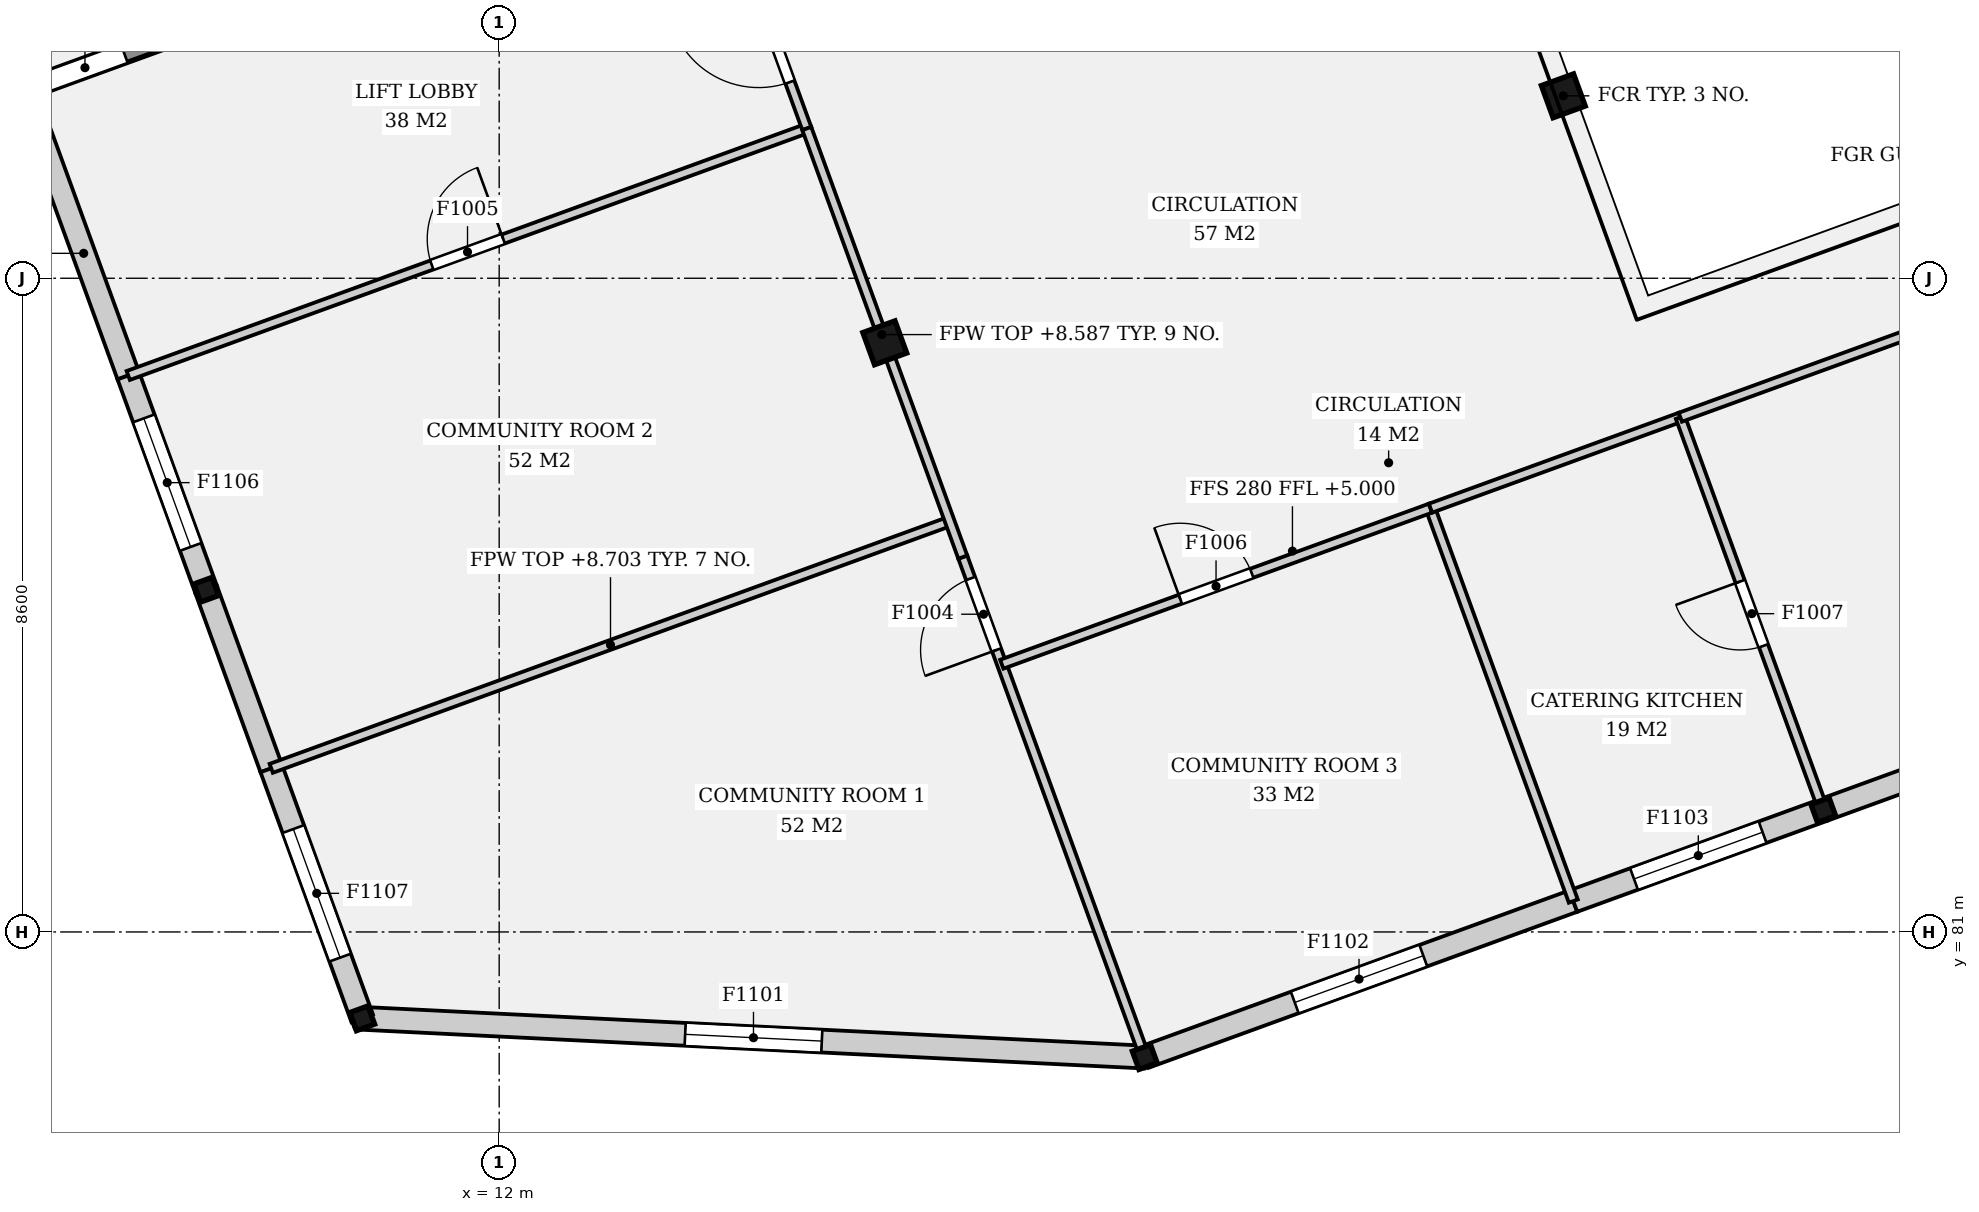
"""IFC4 building model, lengths in metres.
Left out: names, types, materials, properties, quantities, classifications, styles, units other than length and angle.
Written with IfcOpenShell. Run it as: python <this file> out.ifc"""

import sys

from ifc_helpers import new_model, si_unit, direction, frame, frame_2d, origin, origin_2d, place, context, subcontext, project, spatial, rectangle, hollow_rectangle, extrude, element, fill, save


model = new_model("IFC4")
c1 = context("Model", 3, precision=1e-05, world=origin(), true_north=direction((0.0, 1.0)))
c2 = subcontext(c1, "Body", "Model", "MODEL_VIEW")
j1 = project(units=[si_unit("LENGTHUNIT", "METRE"), si_unit("PLANEANGLEUNIT", "RADIAN")], contexts=[c1])
p1 = place(None, origin())
s1 = spatial("IfcSite", under=j1, at=p1, CompositionType="ELEMENT")
p2 = place(p1, origin())
s2 = spatial("IfcBuilding", under=s1, at=p2, CompositionType="ELEMENT")
p3 = place(p2, frame((0.0, 0.0, 5.0)))
s3 = spatial("IfcBuildingStorey", under=s2, at=p3, CompositionType="ELEMENT", Elevation=5.0)
for number, where, z_axis, x_axis in (
    (1, (10.198, 79.864, 0.0), (0.0, 0.0, 1.0), (0.94, 0.342, 0.0)),
    (2, (20.493, 79.354, 0.0), (0.0, 0.0, 1.0), (0.94, 0.342, 0.0)),
    (3, (29.42, 82.603, 0.0), (0.0, 0.0, 1.0), (0.94, 0.342, 0.0)),
    (4, (8.146, 85.502, 0.0), (0.0, 0.0, 1.0), (0.94, 0.342, 0.0)),
):
    element("IfcColumn", number, at=place(p3, frame(where, z_axis=z_axis, x_axis=x_axis)), inside=s3, PredefinedType="COLUMN", context=c2, shape_type="SweptSolid", body=[
        extrude(hollow_rectangle(XDim=0.254, YDim=0.254, WallThickness=0.012, at=origin_2d()), origin(), (0.0, 0.0, 1.0), 4.4),
    ])
for number, where, z_axis, x_axis in (
    (5, (17.073, 88.751, 0.0), (0.0, 0.0, 1.0), (0.94, 0.342, 0.0)),
    (6, (26.0, 92.0, 0.0), (0.0, 0.0, 1.0), (0.94, 0.342, 0.0)),
):
    element("IfcColumn", number, at=place(p3, frame(where, z_axis=z_axis, x_axis=x_axis)), inside=s3, PredefinedType="COLUMN", context=c2, shape_type="SweptSolid", body=[
        extrude(rectangle(XDim=0.45, YDim=0.45, at=origin_2d()), origin(), (0.0, 0.0, 1.0), 4.4),
    ])
p4 = place(p3, frame((5.752, 92.08, 0.0), z_axis=(0.0, 0.0, 1.0), x_axis=(0.939697665127, 0.342006283793, 0.0)))
e7 = element("IfcWall", 7, at=p4, inside=s3, PredefinedType="SOLIDWALL", context=c2, shape_type="SweptSolid", body=[
    extrude(rectangle(XDim=7.0, YDim=0.25, at=frame_2d((3.5, 0.0))), origin(), (0.0, 0.0, 1.0), 4.12),
])
p5 = place(p4, frame((0.3, 0.0, 0.0)))
e8 = element("IfcOpeningElement", 8, at=p5, cuts=e7, PredefinedType="OPENING", context=c2, shape_type="SweptSolid", body=[
    extrude(rectangle(XDim=1.1, YDim=2.1, at=frame_2d((0.55, 1.05))), frame((0.0, 0.135, 0.0), z_axis=(0.0, -1.0, 0.0), x_axis=(1.0, 0.0, 0.0)), (0.0, 0.0, 1.0), 0.27),
])
p6 = place(p3, frame((10.198, 79.864, 0.0), z_axis=(0.0, 0.0, 1.0), x_axis=(0.998777549242, -0.049430831779, 0.0)))
e9 = element("IfcWall", 9, at=p6, inside=s3, PredefinedType="ELEMENTEDWALL", context=c2, shape_type="SweptSolid", body=[
    extrude(rectangle(XDim=10.308, YDim=0.3, at=frame_2d((5.154, 0.0))), origin(), (0.0, 0.0, 1.0), 3.703),
])
p7 = place(p6, frame((4.254, 0.0, 0.9)))
e10 = element("IfcOpeningElement", 10, at=p7, cuts=e9, PredefinedType="OPENING", context=c2, shape_type="SweptSolid", body=[
    extrude(rectangle(XDim=1.8, YDim=2.4, at=frame_2d((0.9, 1.2))), frame((0.0, 0.16, 0.0), z_axis=(0.0, -1.0, 0.0), x_axis=(1.0, 0.0, 0.0)), (0.0, 0.0, 1.0), 0.32),
])
p8 = place(p3, frame((20.493, 79.354, 0.0), z_axis=(0.0, 0.0, 1.0), x_axis=(0.939699533273, 0.342001150825, 0.0)))
e11 = element("IfcWall", 11, at=p8, inside=s3, PredefinedType="ELEMENTEDWALL", context=c2, shape_type="SweptSolid", body=[
    extrude(rectangle(XDim=6.0, YDim=0.3, at=frame_2d((3.0, 0.0))), origin(), (0.0, 0.0, 1.0), 3.703),
])
p9 = place(p8, frame((2.1, 0.0, 0.9)))
e12 = element("IfcOpeningElement", 12, at=p9, cuts=e11, PredefinedType="OPENING", context=c2, shape_type="SweptSolid", body=[
    extrude(rectangle(XDim=1.8, YDim=2.4, at=frame_2d((0.9, 1.2))), frame((0.0, 0.16, 0.0), z_axis=(0.0, -1.0, 0.0), x_axis=(1.0, 0.0, 0.0)), (0.0, 0.0, 1.0), 0.32),
])
p10 = place(p3, frame((26.131, 81.406, 0.0), z_axis=(0.0, 0.0, 1.0), x_axis=(0.939693585395, 0.342017493073, 0.0)))
e13 = element("IfcWall", 13, at=p10, inside=s3, PredefinedType="ELEMENTEDWALL", context=c2, shape_type="SweptSolid", body=[
    extrude(rectangle(XDim=3.5, YDim=0.3, at=frame_2d((1.75, 0.0))), origin(), (0.0, 0.0, 1.0), 3.703),
])
p11 = place(p10, frame((0.85, 0.0, 0.9)))
e14 = element("IfcOpeningElement", 14, at=p11, cuts=e13, PredefinedType="OPENING", context=c2, shape_type="SweptSolid", body=[
    extrude(rectangle(XDim=1.8, YDim=2.4, at=frame_2d((0.9, 1.2))), frame((0.0, 0.16, 0.0), z_axis=(0.0, -1.0, 0.0), x_axis=(1.0, 0.0, 0.0)), (0.0, 0.0, 1.0), 0.32),
])
p12 = place(p3, frame((29.42, 82.603, 0.0), z_axis=(0.0, 0.0, 1.0), x_axis=(0.939692088769, 0.342021605027, 0.0)))
e15 = element("IfcWall", 15, at=p12, inside=s3, PredefinedType="ELEMENTEDWALL", context=c2, shape_type="SweptSolid", body=[
    extrude(rectangle(XDim=9.5, YDim=0.3, at=frame_2d((4.75, 0.0))), origin(), (0.0, 0.0, 1.0), 3.703),
])
p13 = place(p12, frame((3.85, 0.0, 0.9)))
e16 = element("IfcOpeningElement", 16, at=p13, cuts=e15, PredefinedType="OPENING", context=c2, shape_type="SweptSolid", body=[
    extrude(rectangle(XDim=1.8, YDim=2.4, at=frame_2d((0.9, 1.2))), frame((0.0, 0.16, 0.0), z_axis=(0.0, -1.0, 0.0), x_axis=(1.0, 0.0, 0.0)), (0.0, 0.0, 1.0), 0.32),
])
p14 = place(p3, frame((5.752, 92.08, 0.0), z_axis=(0.0, 0.0, 1.0), x_axis=(0.342037080957, -0.939686455819, 0.0)))
e17 = element("IfcWall", 17, at=p14, inside=s3, PredefinedType="ELEMENTEDWALL", context=c2, shape_type="SweptSolid", body=[
    extrude(rectangle(XDim=4.0, YDim=0.3, at=frame_2d((2.0, 0.0))), origin(), (0.0, 0.0, 1.0), 3.703),
])
p15 = place(p3, frame((7.12, 88.321, 0.0), z_axis=(0.0, 0.0, 1.0), x_axis=(0.341965219194, -0.939712609717, 0.0)))
e18 = element("IfcWall", 18, at=p15, inside=s3, PredefinedType="ELEMENTEDWALL", context=c2, shape_type="SweptSolid", body=[
    extrude(rectangle(XDim=3.0, YDim=0.3, at=frame_2d((1.5, 0.0))), origin(), (0.0, 0.0, 1.0), 3.703),
])
p16 = place(p15, frame((0.6, 0.0, 0.9)))
e19 = element("IfcOpeningElement", 19, at=p16, cuts=e18, PredefinedType="OPENING", context=c2, shape_type="SweptSolid", body=[
    extrude(rectangle(XDim=1.8, YDim=2.4, at=frame_2d((0.9, 1.2))), frame((0.0, 0.16, 0.0), z_axis=(0.0, -1.0, 0.0), x_axis=(1.0, 0.0, 0.0)), (0.0, 0.0, 1.0), 0.32),
])
p17 = place(p3, frame((8.146, 85.502, 0.0), z_axis=(0.0, 0.0, 1.0), x_axis=(0.342064500802, -0.939676474799, 0.0)))
e20 = element("IfcWall", 20, at=p17, inside=s3, PredefinedType="ELEMENTEDWALL", context=c2, shape_type="SweptSolid", body=[
    extrude(rectangle(XDim=2.5, YDim=0.3, at=frame_2d((1.25, 0.0))), origin(), (0.0, 0.0, 1.0), 3.703),
])
p18 = place(p3, frame((9.001, 83.152, 0.0), z_axis=(0.0, 0.0, 1.0), x_axis=(0.342017493073, -0.939693585395, 0.0)))
e21 = element("IfcWall", 21, at=p18, inside=s3, PredefinedType="ELEMENTEDWALL", context=c2, shape_type="SweptSolid", body=[
    extrude(rectangle(XDim=3.5, YDim=0.3, at=frame_2d((1.75, 0.0))), origin(), (0.0, 0.0, 1.0), 3.703),
])
p19 = place(p18, frame((0.85, 0.0, 0.9)))
e22 = element("IfcOpeningElement", 22, at=p19, cuts=e21, PredefinedType="OPENING", context=c2, shape_type="SweptSolid", body=[
    extrude(rectangle(XDim=1.8, YDim=2.4, at=frame_2d((0.9, 1.2))), frame((0.0, 0.16, 0.0), z_axis=(0.0, -1.0, 0.0), x_axis=(1.0, 0.0, 0.0)), (0.0, 0.0, 1.0), 0.32),
])
p20 = place(p3, frame((7.12, 88.321, 0.0), z_axis=(0.0, 0.0, 1.0), x_axis=(0.939697342025, 0.342007171549, 0.0)))
e23 = element("IfcWall", 23, at=p20, inside=s3, PredefinedType="PARTITIONING", context=c2, shape_type="SweptSolid", body=[
    extrude(rectangle(XDim=9.5, YDim=0.125, at=frame_2d((4.75, 0.0))), origin(), (0.0, 0.0, 1.0), 3.587),
])
p21 = place(p20, frame((4.25, 0.0, 0.0)))
e24 = element("IfcOpeningElement", 24, at=p21, cuts=e23, PredefinedType="OPENING", context=c2, shape_type="SweptSolid", body=[
    extrude(rectangle(XDim=1.0, YDim=2.1, at=frame_2d((0.5, 1.05))), frame((0.0, 0.073, 0.0), z_axis=(0.0, -1.0, 0.0), x_axis=(1.0, 0.0, 0.0)), (0.0, 0.0, 1.0), 0.145),
])
p22 = place(p3, frame((16.047, 91.57, 0.0), z_axis=(0.0, 0.0, 1.0), x_axis=(-0.342037080957, 0.939686455819, 0.0)))
e25 = element("IfcWall", 25, at=p22, inside=s3, PredefinedType="PARTITIONING", context=c2, shape_type="SweptSolid", body=[
    extrude(rectangle(XDim=4.0, YDim=0.125, at=frame_2d((2.0, 0.0))), origin(), (0.0, 0.0, 1.0), 3.587),
])
p23 = place(p22, frame((0.65, 0.0, 0.0)))
e26 = element("IfcOpeningElement", 26, at=p23, cuts=e25, PredefinedType="OPENING", context=c2, shape_type="SweptSolid", body=[
    extrude(rectangle(XDim=1.2, YDim=2.1, at=frame_2d((0.6, 1.05))), frame((0.0, 0.073, 0.0), z_axis=(0.0, -1.0, 0.0), x_axis=(1.0, 0.0, 0.0)), (0.0, 0.0, 1.0), 0.145),
])
p24 = place(p3, frame((26.131, 81.406, 0.0), z_axis=(0.0, 0.0, 1.0), x_axis=(-0.34202461616, 0.939690992795, 0.0)))
e27 = element("IfcWall", 27, at=p24, inside=s3, PredefinedType="PARTITIONING", context=c2, shape_type="SweptSolid", body=[
    extrude(rectangle(XDim=5.5, YDim=0.125, at=frame_2d((2.75, 0.0))), origin(), (0.0, 0.0, 1.0), 3.703),
])
p25 = place(p3, frame((24.25, 86.574, 0.0), z_axis=(0.0, 0.0, 1.0), x_axis=(0.939671164665, 0.342079087782, 0.0)))
e28 = element("IfcWall", 28, at=p25, inside=s3, PredefinedType="PARTITIONING", context=c2, shape_type="SweptSolid", body=[
    extrude(rectangle(XDim=3.5, YDim=0.125, at=frame_2d((1.75, 0.0))), origin(), (0.0, 0.0, 1.0), 3.703),
])
p26 = place(p3, frame((29.42, 82.603, 0.0), z_axis=(0.0, 0.0, 1.0), x_axis=(-0.342010349897, 0.939696185245, 0.0)))
e29 = element("IfcWall", 29, at=p26, inside=s3, PredefinedType="PARTITIONING", context=c2, shape_type="SweptSolid", body=[
    extrude(rectangle(XDim=5.5, YDim=0.125, at=frame_2d((2.75, 0.0))), origin(), (0.0, 0.0, 1.0), 3.703),
])
p27 = place(p26, frame((2.3, 0.0, 0.0)))
e30 = element("IfcOpeningElement", 30, at=p27, cuts=e29, PredefinedType="OPENING", context=c2, shape_type="SweptSolid", body=[
    extrude(rectangle(XDim=0.9, YDim=2.1, at=frame_2d((0.45, 1.05))), frame((0.0, 0.073, 0.0), z_axis=(0.0, -1.0, 0.0), x_axis=(1.0, 0.0, 0.0)), (0.0, 0.0, 1.0), 0.145),
])
p28 = place(p3, frame((9.001, 83.152, 0.0), z_axis=(0.0, 0.0, 1.0), x_axis=(0.939689082478, 0.342029864589, 0.0)))
e31 = element("IfcWall", 31, at=p28, inside=s3, PredefinedType="PARTITIONING", context=c2, shape_type="SweptSolid", body=[
    extrude(rectangle(XDim=9.5, YDim=0.125, at=frame_2d((4.75, 0.0))), origin(), (0.0, 0.0, 1.0), 3.703),
])
p29 = place(p3, frame((20.493, 79.354, 0.0), z_axis=(0.0, 0.0, 1.0), x_axis=(-0.342017493073, 0.939693585395, 0.0)))
e32 = element("IfcWall", 32, at=p29, inside=s3, PredefinedType="PARTITIONING", context=c2, shape_type="SweptSolid", body=[
    extrude(rectangle(XDim=7.0, YDim=0.125, at=frame_2d((3.5, 0.0))), origin(), (0.0, 0.0, 1.0), 3.587),
])
p30 = place(p29, frame((5.7, 0.0, 0.0)))
e33 = element("IfcOpeningElement", 33, at=p30, cuts=e32, PredefinedType="OPENING", context=c2, shape_type="SweptSolid", body=[
    extrude(rectangle(XDim=1.0, YDim=2.1, at=frame_2d((0.5, 1.05))), frame((0.0, 0.073, 0.0), z_axis=(0.0, -1.0, 0.0), x_axis=(1.0, 0.0, 0.0)), (0.0, 0.0, 1.0), 0.145),
])
p31 = place(p3, frame((18.612, 84.522, 0.0), z_axis=(0.0, 0.0, 1.0), x_axis=(0.939699533273, 0.342001150825, 0.0)))
e34 = element("IfcWall", 34, at=p31, inside=s3, PredefinedType="PARTITIONING", context=c2, shape_type="SweptSolid", body=[
    extrude(rectangle(XDim=6.0, YDim=0.125, at=frame_2d((3.0, 0.0))), origin(), (0.0, 0.0, 1.0), 3.587),
])
p32 = place(p31, frame((2.5, 0.0, 0.0)))
e35 = element("IfcOpeningElement", 35, at=p32, cuts=e34, PredefinedType="OPENING", context=c2, shape_type="SweptSolid", body=[
    extrude(rectangle(XDim=1.0, YDim=2.1, at=frame_2d((0.5, 1.05))), frame((0.0, 0.073, 0.0), z_axis=(0.0, -1.0, 0.0), x_axis=(1.0, 0.0, 0.0)), (0.0, 0.0, 1.0), 0.145),
])
p33 = place(p3, frame((18.099, 85.932, 0.0), z_axis=(0.0, 0.0, 1.0), x_axis=(-0.342037080957, 0.939686455819, 0.0)))
e36 = element("IfcWall", 36, at=p33, inside=s3, PredefinedType="PARTITIONING", context=c2, shape_type="SweptSolid", body=[
    extrude(rectangle(XDim=6.0, YDim=0.125, at=frame_2d((3.0, 0.0))), origin(), (0.0, 0.0, 1.0), 3.587),
])
p34 = place(p3, frame((27.539, 87.771, 0.0), z_axis=(0.0, 0.0, 1.0), x_axis=(0.939696917863, 0.342008336972, 0.0)))
e37 = element("IfcWall", 37, at=p34, inside=s3, PredefinedType="PARTITIONING", context=c2, shape_type="SweptSolid", body=[
    extrude(rectangle(XDim=15.0, YDim=0.125, at=frame_2d((7.5, 0.0))), origin(), (0.0, 0.0, 1.0), 3.703),
])
p35 = place(p34, frame((6.6, 0.0, 0.0)))
e38 = element("IfcOpeningElement", 38, at=p35, cuts=e37, PredefinedType="OPENING", context=c2, shape_type="SweptSolid", body=[
    extrude(rectangle(XDim=1.8, YDim=2.1, at=frame_2d((0.9, 1.05))), frame((0.0, 0.073, 0.0), z_axis=(0.0, -1.0, 0.0), x_axis=(1.0, 0.0, 0.0)), (0.0, 0.0, 1.0), 0.145),
])
p36 = place(p7, origin())
e39 = element("IfcWindow", 39, at=p36, inside=s3, PartitioningType="SINGLE_PANEL", PredefinedType="WINDOW", context=c2, shape_type="SweptSolid", body=[
    extrude(rectangle(XDim=1.8, YDim=2.4, at=frame_2d((0.9, 1.2))), frame((0.0, 0.03, 0.0), z_axis=(0.0, -1.0, 0.0), x_axis=(1.0, 0.0, 0.0)), (0.0, 0.0, 1.0), 0.06),
])
fill(e10, e39)
p37 = place(p9, origin())
e40 = element("IfcWindow", 40, at=p37, inside=s3, PartitioningType="SINGLE_PANEL", PredefinedType="WINDOW", context=c2, shape_type="SweptSolid", body=[
    extrude(rectangle(XDim=1.8, YDim=2.4, at=frame_2d((0.9, 1.2))), frame((0.0, 0.03, 0.0), z_axis=(0.0, -1.0, 0.0), x_axis=(1.0, 0.0, 0.0)), (0.0, 0.0, 1.0), 0.06),
])
fill(e12, e40)
p38 = place(p11, origin())
e41 = element("IfcWindow", 41, at=p38, inside=s3, PartitioningType="SINGLE_PANEL", PredefinedType="WINDOW", context=c2, shape_type="SweptSolid", body=[
    extrude(rectangle(XDim=1.8, YDim=2.4, at=frame_2d((0.9, 1.2))), frame((0.0, 0.03, 0.0), z_axis=(0.0, -1.0, 0.0), x_axis=(1.0, 0.0, 0.0)), (0.0, 0.0, 1.0), 0.06),
])
fill(e14, e41)
p39 = place(p16, origin())
e42 = element("IfcWindow", 42, at=p39, inside=s3, PartitioningType="SINGLE_PANEL", PredefinedType="WINDOW", context=c2, shape_type="SweptSolid", body=[
    extrude(rectangle(XDim=1.8, YDim=2.4, at=frame_2d((0.9, 1.2))), frame((0.0, 0.03, 0.0), z_axis=(0.0, -1.0, 0.0), x_axis=(1.0, 0.0, 0.0)), (0.0, 0.0, 1.0), 0.06),
])
fill(e19, e42)
p40 = place(p19, origin())
e43 = element("IfcWindow", 43, at=p40, inside=s3, PartitioningType="SINGLE_PANEL", PredefinedType="WINDOW", context=c2, shape_type="SweptSolid", body=[
    extrude(rectangle(XDim=1.8, YDim=2.4, at=frame_2d((0.9, 1.2))), frame((0.0, 0.03, 0.0), z_axis=(0.0, -1.0, 0.0), x_axis=(1.0, 0.0, 0.0)), (0.0, 0.0, 1.0), 0.06),
])
fill(e22, e43)
p41 = place(p5, origin())
e44 = element("IfcDoor", 44, at=p41, inside=s3, OperationType="SINGLE_SWING_LEFT", PredefinedType="DOOR", context=c2, shape_type="SweptSolid", body=[
    extrude(rectangle(XDim=1.1, YDim=2.1, at=frame_2d((0.55, 1.05))), frame((0.0, 0.025, 0.0), z_axis=(0.0, -1.0, 0.0), x_axis=(1.0, 0.0, 0.0)), (0.0, 0.0, 1.0), 0.05),
])
fill(e8, e44)
p42 = place(p23, origin())
e45 = element("IfcDoor", 45, at=p42, inside=s3, OperationType="SINGLE_SWING_RIGHT", PredefinedType="DOOR", context=c2, shape_type="SweptSolid", body=[
    extrude(rectangle(XDim=1.2, YDim=2.1, at=frame_2d((0.6, 1.05))), frame((0.0, 0.025, 0.0), z_axis=(0.0, -1.0, 0.0), x_axis=(1.0, 0.0, 0.0)), (0.0, 0.0, 1.0), 0.05),
])
fill(e26, e45)
p43 = place(p30, origin())
e46 = element("IfcDoor", 46, at=p43, inside=s3, OperationType="SINGLE_SWING_LEFT", PredefinedType="DOOR", context=c2, shape_type="SweptSolid", body=[
    extrude(rectangle(XDim=1.0, YDim=2.1, at=frame_2d((0.5, 1.05))), frame((0.0, 0.025, 0.0), z_axis=(0.0, -1.0, 0.0), x_axis=(1.0, 0.0, 0.0)), (0.0, 0.0, 1.0), 0.05),
])
fill(e33, e46)
p44 = place(p21, origin())
e47 = element("IfcDoor", 47, at=p44, inside=s3, OperationType="SINGLE_SWING_RIGHT", PredefinedType="DOOR", context=c2, shape_type="SweptSolid", body=[
    extrude(rectangle(XDim=1.0, YDim=2.1, at=frame_2d((0.5, 1.05))), frame((0.0, 0.025, 0.0), z_axis=(0.0, -1.0, 0.0), x_axis=(1.0, 0.0, 0.0)), (0.0, 0.0, 1.0), 0.05),
])
fill(e24, e47)
p45 = place(p32, origin())
e48 = element("IfcDoor", 48, at=p45, inside=s3, OperationType="SINGLE_SWING_LEFT", PredefinedType="DOOR", context=c2, shape_type="SweptSolid", body=[
    extrude(rectangle(XDim=1.0, YDim=2.1, at=frame_2d((0.5, 1.05))), frame((0.0, 0.025, 0.0), z_axis=(0.0, -1.0, 0.0), x_axis=(1.0, 0.0, 0.0)), (0.0, 0.0, 1.0), 0.05),
])
fill(e35, e48)
p46 = place(p27, origin())
e49 = element("IfcDoor", 49, at=p46, inside=s3, OperationType="SINGLE_SWING_RIGHT", PredefinedType="DOOR", context=c2, shape_type="SweptSolid", body=[
    extrude(rectangle(XDim=0.9, YDim=2.1, at=frame_2d((0.45, 1.05))), frame((0.0, 0.025, 0.0), z_axis=(0.0, -1.0, 0.0), x_axis=(1.0, 0.0, 0.0)), (0.0, 0.0, 1.0), 0.05),
])
fill(e30, e49)
save(model, sys.argv[1])
